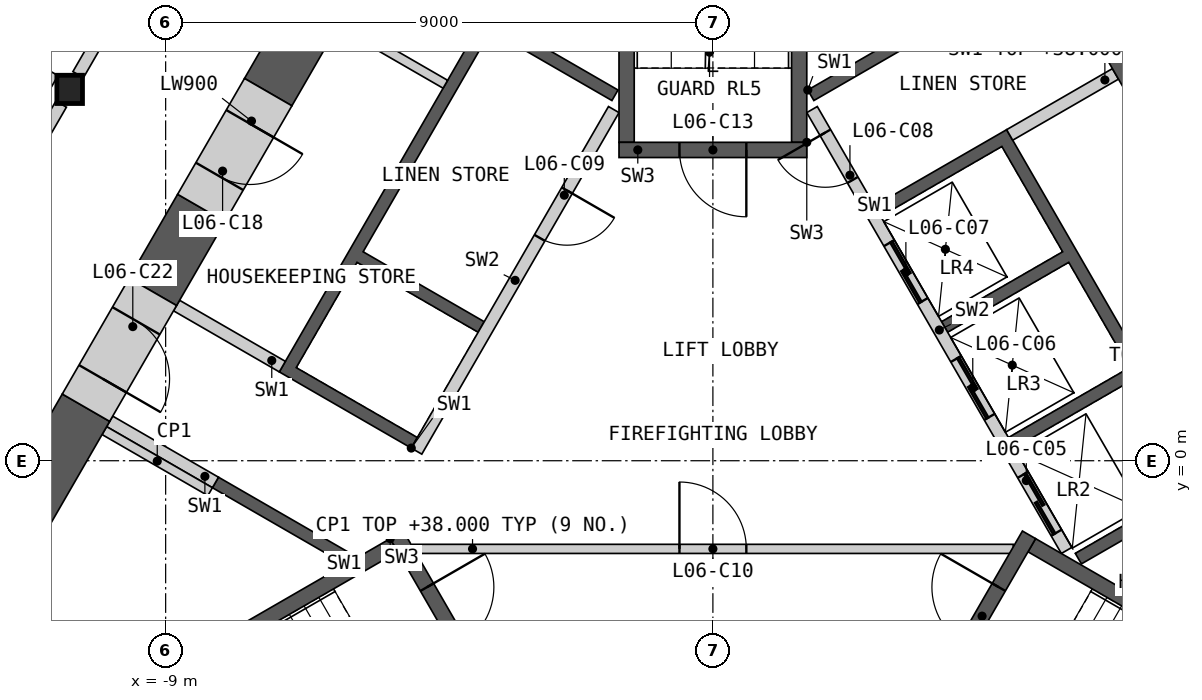
"""IFC4 building model, lengths in metres.
Left out: names, types, materials, properties, quantities, classifications, styles, units other than length and angle.
Written with IfcOpenShell. Run it as: python <this file> out.ifc"""

import sys

from ifc_helpers import new_model, si_unit, direction, frame, frame_2d, origin, origin_2d, place, context, subcontext, project, spatial, polyline, rectangle, i_section, outline, extrude, element, fill, save


model = new_model("IFC4")
c1 = context("Model", 3, precision=1e-05, world=origin(), true_north=direction((0.0, 1.0)))
c2 = subcontext(c1, "Body", "Model", "MODEL_VIEW")
j1 = project(units=[si_unit("LENGTHUNIT", "METRE"), si_unit("PLANEANGLEUNIT", "RADIAN")], contexts=[c1])
p1 = place(None, origin())
s1 = spatial("IfcSite", under=j1, at=p1, CompositionType="ELEMENT")
p2 = place(p1, origin())
s2 = spatial("IfcBuilding", under=s1, at=p2, CompositionType="ELEMENT")
p3 = place(p2, frame((0.0, 0.0, 34.2)))
s3 = spatial("IfcBuildingStorey", under=s2, at=p3, CompositionType="ELEMENT", Elevation=34.2)
p4 = place(p3, frame((-10.578, 6.107, 0.0), z_axis=(0.0, 0.0, 1.0), x_axis=(1.0, 0.0, 0.0)))
e1 = element("IfcColumn", 1, at=p4, inside=s3, PredefinedType="COLUMN", context=c2, shape_type="SweptSolid", body=[
    extrude(i_section(OverallWidth=0.421, OverallDepth=0.465, WebThickness=0.045, FlangeThickness=0.072, at=origin_2d()), origin(), (0.0, 0.0, 1.0), 4.2),
])
p5 = place(p3, origin())
e2 = element("IfcWall", 2, at=p5, inside=s3, PredefinedType="SHEAR", context=c2, shape_type="SweptSolid", body=[
    extrude(outline(polyline([(1.561, 6.097), (3.731, 7.35), (3.831, 7.177), (1.66, 5.924), (1.561, 6.097)])), origin(), (0.0, 0.0, 1.0), 3.8),
])
p6 = place(p3, origin())
e3 = element("IfcWall", 3, at=p6, inside=s3, PredefinedType="SHEAR", context=c2, shape_type="SweptSolid", body=[
    extrude(outline(polyline([(2.66, 4.192), (4.831, 5.445), (8.231, -0.444), (6.061, -1.697), (5.96, -1.524), (7.952, -0.374), (6.952, 1.358), (4.96, 0.208), (4.861, 0.381), (6.852, 1.531), (5.852, 3.263), (3.861, 2.113), (3.76, 2.287), (5.752, 3.437), (4.752, 5.169), (2.76, 4.019), (2.66, 4.192)])), origin(), (0.0, 0.0, 1.0), 3.8),
])
p7 = place(p3, frame((5.817, -1.476, 0.0), z_axis=(0.0, 0.0, 1.0), x_axis=(-0.500002616675, 0.866023893041, 0.0)))
e4 = element("IfcWall", 4, at=p7, inside=s3, PredefinedType="SOLIDWALL", context=c2, shape_type="SweptSolid", body=[
    extrude(rectangle(XDim=8.373, YDim=0.2, at=frame_2d((4.187, 0.0))), origin(), (0.0, 0.0, 1.0), 3.8),
])
p8 = place(p7, frame((0.337, 0.0, 0.0)))
e5 = element("IfcOpeningElement", 5, at=p8, cuts=e4, PredefinedType="OPENING", context=c2, shape_type="SweptSolid", body=[
    extrude(rectangle(XDim=1.1, YDim=2.1, at=frame_2d((0.55, 1.05))), frame((0.0, 0.11, 0.0), z_axis=(0.0, -1.0, 0.0), x_axis=(1.0, 0.0, 0.0)), (0.0, 0.0, 1.0), 0.22),
])
p9 = place(p7, frame((2.537, 0.0, 0.0)))
e6 = element("IfcOpeningElement", 6, at=p9, cuts=e4, PredefinedType="OPENING", context=c2, shape_type="SweptSolid", body=[
    extrude(rectangle(XDim=1.1, YDim=2.1, at=frame_2d((0.55, 1.05))), frame((0.0, 0.11, 0.0), z_axis=(0.0, -1.0, 0.0), x_axis=(1.0, 0.0, 0.0)), (0.0, 0.0, 1.0), 0.22),
])
p10 = place(p7, frame((4.737, 0.0, 0.0)))
e7 = element("IfcOpeningElement", 7, at=p10, cuts=e4, PredefinedType="OPENING", context=c2, shape_type="SweptSolid", body=[
    extrude(rectangle(XDim=1.1, YDim=2.1, at=frame_2d((0.55, 1.05))), frame((0.0, 0.11, 0.0), z_axis=(0.0, -1.0, 0.0), x_axis=(1.0, 0.0, 0.0)), (0.0, 0.0, 1.0), 0.22),
])
p11 = place(p7, frame((7.037, 0.0, 0.0)))
e8 = element("IfcOpeningElement", 8, at=p11, cuts=e4, PredefinedType="OPENING", context=c2, shape_type="SweptSolid", body=[
    extrude(rectangle(XDim=0.9, YDim=2.1, at=frame_2d((0.45, 1.05))), frame((0.0, 0.11, 0.0), z_axis=(0.0, -1.0, 0.0), x_axis=(1.0, 0.0, 0.0)), (0.0, 0.0, 1.0), 0.22),
])
p12 = place(p3, frame((4.881, 5.358, 0.0), z_axis=(0.0, 0.0, 1.0), x_axis=(0.866035824272, 0.499981950752, 0.0)))
e9 = element("IfcWall", 9, at=p12, inside=s3, PredefinedType="SHEAR", context=c2, shape_type="SweptSolid", body=[
    extrude(rectangle(XDim=2.009, YDim=0.2, at=frame_2d((1.004, 0.0))), origin(), (0.0, 0.0, 1.0), 3.8),
])
p13 = place(p3, origin())
e10 = element("IfcWall", 10, at=p13, inside=s3, PredefinedType="SHEAR", context=c2, shape_type="SweptSolid", body=[
    extrude(outline(polyline([(-6.061, -1.697), (-8.231, -0.444), (-8.131, -0.271), (-5.96, -1.524), (-6.061, -1.697)])), origin(), (0.0, 0.0, 1.0), 3.8),
])
p14 = place(p3, origin())
e11 = element("IfcWall", 11, at=p14, inside=s3, PredefinedType="SHEAR", context=c2, shape_type="SweptSolid", body=[
    extrude(outline(polyline([(-4.96, 0.208), (-7.131, 1.461), (-3.731, 7.35), (-1.561, 6.097), (-1.66, 5.924), (-3.652, 7.074), (-5.752, 3.437), (-3.76, 2.287), (-3.861, 2.113), (-5.852, 3.263), (-6.852, 1.531), (-4.861, 0.381), (-4.96, 0.208)])), origin(), (0.0, 0.0, 1.0), 3.8),
])
p15 = place(p3, frame((-1.631, 5.776, 0.0), z_axis=(0.0, 0.0, 1.0), x_axis=(-0.499992876559, -0.866029516466, 0.0)))
e12 = element("IfcWall", 12, at=p15, inside=s3, PredefinedType="SOLIDWALL", context=c2, shape_type="SweptSolid", body=[
    extrude(rectangle(XDim=6.486, YDim=0.2, at=frame_2d((3.243, 0.0))), origin(), (0.0, 0.0, 1.0), 3.8),
])
p16 = place(p15, frame((1.537, 0.0, 0.0)))
e13 = element("IfcOpeningElement", 13, at=p16, cuts=e12, PredefinedType="OPENING", context=c2, shape_type="SweptSolid", body=[
    extrude(rectangle(XDim=0.9, YDim=2.1, at=frame_2d((0.45, 1.05))), frame((0.0, 0.11, 0.0), z_axis=(0.0, -1.0, 0.0), x_axis=(1.0, 0.0, 0.0)), (0.0, 0.0, 1.0), 0.22),
])
p17 = place(p3, frame((-7.081, 1.548, 0.0), z_axis=(0.0, 0.0, 1.0), x_axis=(-0.865983199114, 0.50007309351, 0.0)))
e14 = element("IfcWall", 14, at=p17, inside=s3, PredefinedType="SHEAR", context=c2, shape_type="SweptSolid", body=[
    extrude(rectangle(XDim=2.009, YDim=0.2, at=frame_2d((1.004, 0.0))), origin(), (0.0, 0.0, 1.0), 3.8),
])
p18 = place(p3, frame((-8.181, -0.357, 0.0), z_axis=(0.0, 0.0, 1.0), x_axis=(-0.866035824272, 0.499981950752, 0.0)))
e15 = element("IfcWall", 15, at=p18, inside=s3, PredefinedType="SHEAR", context=c2, shape_type="SweptSolid", body=[
    extrude(rectangle(XDim=2.009, YDim=0.2, at=frame_2d((1.004, 0.0))), origin(), (0.0, 0.0, 1.0), 3.8),
])
p19 = place(p3, frame((-4.941, -1.45, 0.0), z_axis=(0.0, 0.0, 1.0), x_axis=(1.0, 0.0, 0.0)))
e16 = element("IfcWall", 16, at=p19, inside=s3, PredefinedType="PARTITIONING", context=c2, shape_type="SweptSolid", body=[
    extrude(rectangle(XDim=9.882, YDim=0.15, at=frame_2d((4.941, 0.0))), origin(), (0.0, 0.0, 1.0), 3.8),
])
p20 = place(p19, frame((4.391, 0.0, 0.0)))
e17 = element("IfcOpeningElement", 17, at=p20, cuts=e16, PredefinedType="OPENING", context=c2, shape_type="SweptSolid", body=[
    extrude(rectangle(XDim=1.1, YDim=2.1, at=frame_2d((0.55, 1.05))), frame((0.0, 0.085, 0.0), z_axis=(0.0, -1.0, 0.0), x_axis=(1.0, 0.0, 0.0)), (0.0, 0.0, 1.0), 0.17),
])
p21 = place(p3, origin())
e18 = element("IfcWall", 18, at=p21, inside=s3, PredefinedType="SHEAR", context=c2, shape_type="SweptSolid", body=[
    extrude(outline(polyline([(-5.307, -1.281), (-10.374, -4.206), (-10.032, -4.298), (-5.182, -1.498), (-5.307, -1.281)])), origin(), (0.0, 0.0, 1.0), 3.8),
])
p22 = place(p3, frame((-5.199, -1.219, 0.0), z_axis=(0.0, 0.0, 1.0), x_axis=(0.499982516597, -0.866035497597, 0.0)))
e19 = element("IfcWall", 19, at=p22, inside=s3, PredefinedType="SHEAR", context=c2, shape_type="SweptSolid", body=[
    extrude(rectangle(XDim=3.088, YDim=0.25, at=frame_2d((1.544, 0.0))), origin(), (0.0, 0.0, 1.0), 3.8),
])
p23 = place(p22, frame((0.994, 0.0, 0.0)))
e20 = element("IfcOpeningElement", 20, at=p23, cuts=e19, PredefinedType="OPENING", context=c2, shape_type="SweptSolid", body=[
    extrude(rectangle(XDim=1.1, YDim=2.1, at=frame_2d((0.55, 1.05))), frame((0.0, 0.135, 0.0), z_axis=(0.0, -1.0, 0.0), x_axis=(1.0, 0.0, 0.0)), (0.0, 0.0, 1.0), 0.27),
])
p24 = place(p3, origin())
e21 = element("IfcWall", 21, at=p24, inside=s3, PredefinedType="SHEAR", context=c2, shape_type="SweptSolid", body=[
    extrude(outline(polyline([(10.032, -4.298), (10.374, -4.206), (5.307, -1.281), (5.182, -1.498), (10.032, -4.298)])), origin(), (0.0, 0.0, 1.0), 3.8),
])
p25 = place(p3, frame((3.655, -3.893, 0.0), z_axis=(0.0, 0.0, 1.0), x_axis=(0.499982516597, 0.866035497597, 0.0)))
e22 = element("IfcWall", 22, at=p25, inside=s3, PredefinedType="SHEAR", context=c2, shape_type="SweptSolid", body=[
    extrude(rectangle(XDim=3.088, YDim=0.25, at=frame_2d((1.544, 0.0))), origin(), (0.0, 0.0, 1.0), 3.8),
])
p26 = place(p25, frame((0.994, 0.0, 0.0)))
e23 = element("IfcOpeningElement", 23, at=p26, cuts=e22, PredefinedType="OPENING", context=c2, shape_type="SweptSolid", body=[
    extrude(rectangle(XDim=1.1, YDim=2.1, at=frame_2d((0.55, 1.05))), frame((0.0, 0.135, 0.0), z_axis=(0.0, -1.0, 0.0), x_axis=(1.0, 0.0, 0.0)), (0.0, 0.0, 1.0), 0.27),
])
p27 = place(p3, origin())
e24 = element("IfcWall", 24, at=p27, inside=s3, PredefinedType="SHEAR", context=c2, shape_type="SweptSolid", body=[
    extrude(outline(polyline([(1.544, 5.237), (1.544, 11.087), (1.294, 10.837), (1.294, 5.237), (1.544, 5.237)])), origin(), (0.0, 0.0, 1.0), 3.8),
])
p28 = place(p3, origin())
e25 = element("IfcWall", 25, at=p28, inside=s3, PredefinedType="SHEAR", context=c2, shape_type="SweptSolid", body=[
    extrude(outline(polyline([(-1.294, 10.837), (-1.544, 11.087), (-1.544, 5.237), (-1.294, 5.237), (-1.294, 10.837)])), origin(), (0.0, 0.0, 1.0), 3.8),
])
p29 = place(p3, frame((1.544, 5.112, 0.0), z_axis=(0.0, 0.0, 1.0), x_axis=(-1.0, 0.0, 0.0)))
e26 = element("IfcWall", 26, at=p29, inside=s3, PredefinedType="SHEAR", context=c2, shape_type="SweptSolid", body=[
    extrude(rectangle(XDim=3.088, YDim=0.25, at=frame_2d((1.544, 0.0))), origin(), (0.0, 0.0, 1.0), 3.8),
])
p30 = place(p29, frame((0.994, 0.0, 0.0)))
e27 = element("IfcOpeningElement", 27, at=p30, cuts=e26, PredefinedType="OPENING", context=c2, shape_type="SweptSolid", body=[
    extrude(rectangle(XDim=1.1, YDim=2.1, at=frame_2d((0.55, 1.05))), frame((0.0, 0.135, 0.0), z_axis=(0.0, -1.0, 0.0), x_axis=(1.0, 0.0, 0.0)), (0.0, 0.0, 1.0), 0.27),
])
for number, where, z_axis, x_axis in (
    (28, (-8.268, -0.509, 0.0), (0.0, 0.0, 1.0), (-0.866, 0.5, 0.0)),
    (29, (-6.139, 7.196, 0.0), (0.0, 0.0, 1.0), (0.866, -0.5, 0.0)),
):
    element("IfcWall", number, at=place(p3, frame(where, z_axis=z_axis, x_axis=x_axis)), inside=s3, PredefinedType="PARTITIONING", context=c2, shape_type="SweptSolid", body=[
        extrude(rectangle(XDim=2.009, YDim=0.15, at=frame_2d((1.004, 0.0))), origin(), (0.0, 0.0, 1.0), 3.8),
    ])
p31 = place(p3, frame((8.16, 4.596, 0.0), z_axis=(0.0, 0.0, 1.0), x_axis=(-0.500012259336, 0.866018325738, 0.0)))
e30 = element("IfcWall", 30, at=p31, inside=s3, PredefinedType="SHEAR", context=c2, shape_type="SweptSolid", body=[
    extrude(rectangle(XDim=7.389, YDim=0.9, at=frame_2d((3.695, 0.0))), origin(), (0.0, 0.0, 1.0), 3.8),
])
p32 = place(p3, frame((-10.31, 0.872, 0.0), z_axis=(0.0, 0.0, 1.0), x_axis=(-0.499946751862, -0.866056144429, 0.0)))
e31 = element("IfcWall", 31, at=p32, inside=s3, PredefinedType="SHEAR", context=c2, shape_type="SweptSolid", body=[
    extrude(rectangle(XDim=2.889, YDim=0.9, at=frame_2d((1.445, 0.0))), origin(), (0.0, 0.0, 1.0), 3.8),
])
p33 = place(p3, frame((-6.145, 8.086, 0.0), z_axis=(0.0, 0.0, 1.0), x_axis=(-0.500026924946, -0.866009858102, 0.0)))
e32 = element("IfcWall", 32, at=p33, inside=s3, PredefinedType="SHEAR", context=c2, shape_type="SweptSolid", body=[
    extrude(rectangle(XDim=2.337, YDim=0.9, at=frame_2d((1.168, 0.0))), origin(), (0.0, 0.0, 1.0), 3.8),
])
p34 = place(p3, frame((-8.413, 4.157, 0.0), z_axis=(0.0, 0.0, 1.0), x_axis=(-0.499961121316, -0.86604784924, 0.0)))
e33 = element("IfcWall", 33, at=p34, inside=s3, PredefinedType="SHEAR", context=c2, shape_type="SweptSolid", body=[
    extrude(rectangle(XDim=1.594, YDim=0.9, at=frame_2d((0.797, 0.0))), origin(), (0.0, 0.0, 1.0), 3.8),
])
p35 = place(p3, frame((-7.313, 6.062, 0.0), z_axis=(0.0, 0.0, 1.0), x_axis=(-0.500077893725, -0.86598042715, 0.0)))
e34 = element("IfcWall", 34, at=p35, inside=s3, PredefinedType="SHEAR", context=c2, shape_type="SweptSolid", body=[
    extrude(rectangle(XDim=2.2, YDim=0.9, at=frame_2d((1.1, 0.0))), origin(), (0.0, 0.0, 1.0), 3.8),
])
p36 = place(p35, frame((0.6, 0.0, 0.0)))
e35 = element("IfcOpeningElement", 35, at=p36, cuts=e34, PredefinedType="OPENING", context=c2, shape_type="SweptSolid", body=[
    extrude(rectangle(XDim=1.0, YDim=2.1, at=frame_2d((0.5, 1.05))), frame((0.0, 0.46, 0.0), z_axis=(0.0, -1.0, 0.0), x_axis=(1.0, 0.0, 0.0)), (0.0, 0.0, 1.0), 0.92),
])
p37 = place(p3, frame((-9.21, 2.777, 0.0), z_axis=(0.0, 0.0, 1.0), x_axis=(-0.500077893725, -0.86598042715, 0.0)))
e36 = element("IfcWall", 36, at=p37, inside=s3, PredefinedType="SHEAR", context=c2, shape_type="SweptSolid", body=[
    extrude(rectangle(XDim=2.2, YDim=0.9, at=frame_2d((1.1, 0.0))), origin(), (0.0, 0.0, 1.0), 3.8),
])
p38 = place(p37, frame((0.55, 0.0, 0.0)))
e37 = element("IfcOpeningElement", 37, at=p38, cuts=e36, PredefinedType="OPENING", context=c2, shape_type="SweptSolid", body=[
    extrude(rectangle(XDim=1.1, YDim=2.1, at=frame_2d((0.55, 1.05))), frame((0.0, 0.46, 0.0), z_axis=(0.0, -1.0, 0.0), x_axis=(1.0, 0.0, 0.0)), (0.0, 0.0, 1.0), 0.92),
])
p39 = place(p3, frame((5.429, 15.026, 0.0), z_axis=(0.0, 0.0, 1.0), x_axis=(0.50001002959, -0.86601961312, 0.0)))
e38 = element("IfcWall", 38, at=p39, inside=s3, PredefinedType="PARTITIONING", context=c2, shape_type="SweptSolid", body=[
    extrude(rectangle(XDim=10.019, YDim=0.2, at=frame_2d((5.009, 0.0))), origin(), (0.0, 0.0, 1.0), 3.8),
])
p40 = place(p39, frame((7.266, 0.0, 0.0)))
e39 = element("IfcOpeningElement", 39, at=p40, cuts=e38, PredefinedType="OPENING", context=c2, shape_type="SweptSolid", body=[
    extrude(rectangle(XDim=1.0, YDim=2.1, at=frame_2d((0.5, 1.05))), frame((0.0, 0.11, 0.0), z_axis=(0.0, -1.0, 0.0), x_axis=(1.0, 0.0, 0.0)), (0.0, 0.0, 1.0), 0.22),
])
p41 = place(p39, frame((2.254, 0.0, 0.0)))
e40 = element("IfcOpeningElement", 40, at=p41, cuts=e38, PredefinedType="OPENING", context=c2, shape_type="SweptSolid", body=[
    extrude(rectangle(XDim=1.0, YDim=2.1, at=frame_2d((0.5, 1.05))), frame((0.0, 0.11, 0.0), z_axis=(0.0, -1.0, 0.0), x_axis=(1.0, 0.0, 0.0)), (0.0, 0.0, 1.0), 0.22),
])
p42 = place(p3, frame((-10.439, 6.35, 0.0), z_axis=(0.0, 0.0, 1.0), x_axis=(0.50001002959, 0.86601961312, 0.0)))
e41 = element("IfcWall", 41, at=p42, inside=s3, PredefinedType="PARTITIONING", context=c2, shape_type="SweptSolid", body=[
    extrude(rectangle(XDim=10.019, YDim=0.2, at=frame_2d((5.009, 0.0))), origin(), (0.0, 0.0, 1.0), 3.8),
])
p43 = place(p42, frame((4.16, 0.0, 0.0)))
e42 = element("IfcOpeningElement", 42, at=p43, cuts=e41, PredefinedType="OPENING", context=c2, shape_type="SweptSolid", body=[
    extrude(rectangle(XDim=1.8, YDim=2.1, at=frame_2d((0.9, 1.05))), frame((0.0, 0.11, 0.0), z_axis=(0.0, -1.0, 0.0), x_axis=(1.0, 0.0, 0.0)), (0.0, 0.0, 1.0), 0.22),
])
p44 = place(p3, frame((-15.728, -2.811, 0.0), z_axis=(0.0, 0.0, 1.0), x_axis=(0.49999175339, 0.866030164915, 0.0)))
e43 = element("IfcWall", 43, at=p44, inside=s3, PredefinedType="PARTITIONING", context=c2, shape_type="SweptSolid", body=[
    extrude(rectangle(XDim=10.019, YDim=0.2, at=frame_2d((5.009, 0.0))), origin(), (0.0, 0.0, 1.0), 3.8),
])
p45 = place(p44, frame((4.484, 0.0, 0.0)))
e44 = element("IfcOpeningElement", 44, at=p45, cuts=e43, PredefinedType="OPENING", context=c2, shape_type="SweptSolid", body=[
    extrude(rectangle(XDim=0.95, YDim=2.1, at=frame_2d((0.475, 1.05))), frame((0.0, 0.11, 0.0), z_axis=(0.0, -1.0, 0.0), x_axis=(1.0, 0.0, 0.0)), (0.0, 0.0, 1.0), 0.22),
])
p46 = place(p3, frame((-21.947, 12.671, 0.0), z_axis=(0.0, 0.0, 1.0), x_axis=(0.866026729935, -0.499997703033, 0.0)))
e45 = element("IfcWall", 45, at=p46, inside=s3, PredefinedType="PARTITIONING", context=c2, shape_type="SweptSolid", body=[
    extrude(rectangle(XDim=12.848, YDim=0.2, at=frame_2d((6.424, 0.0))), origin(), (0.0, 0.0, 1.0), 2.885),
])
p47 = place(p8, origin())
e46 = element("IfcDoor", 46, at=p47, inside=s3, OperationType="SLIDING_TO_LEFT", PredefinedType="DOOR", context=c2, shape_type="SweptSolid", body=[
    extrude(rectangle(XDim=1.1, YDim=2.1, at=frame_2d((0.55, 1.05))), frame((0.0, 0.025, 0.0), z_axis=(0.0, -1.0, 0.0), x_axis=(1.0, 0.0, 0.0)), (0.0, 0.0, 1.0), 0.05),
])
fill(e5, e46)
p48 = place(p9, origin())
e47 = element("IfcDoor", 47, at=p48, inside=s3, OperationType="SLIDING_TO_LEFT", PredefinedType="DOOR", context=c2, shape_type="SweptSolid", body=[
    extrude(rectangle(XDim=1.1, YDim=2.1, at=frame_2d((0.55, 1.05))), frame((0.0, 0.025, 0.0), z_axis=(0.0, -1.0, 0.0), x_axis=(1.0, 0.0, 0.0)), (0.0, 0.0, 1.0), 0.05),
])
fill(e6, e47)
p49 = place(p10, origin())
e48 = element("IfcDoor", 48, at=p49, inside=s3, OperationType="SLIDING_TO_LEFT", PredefinedType="DOOR", context=c2, shape_type="SweptSolid", body=[
    extrude(rectangle(XDim=1.1, YDim=2.1, at=frame_2d((0.55, 1.05))), frame((0.0, 0.025, 0.0), z_axis=(0.0, -1.0, 0.0), x_axis=(1.0, 0.0, 0.0)), (0.0, 0.0, 1.0), 0.05),
])
fill(e7, e48)
p50 = place(p11, origin())
e49 = element("IfcDoor", 49, at=p50, inside=s3, OperationType="SINGLE_SWING_RIGHT", PredefinedType="DOOR", context=c2, shape_type="SweptSolid", body=[
    extrude(rectangle(XDim=0.9, YDim=2.1, at=frame_2d((0.45, 1.05))), frame((0.0, 0.025, 0.0), z_axis=(0.0, -1.0, 0.0), x_axis=(1.0, 0.0, 0.0)), (0.0, 0.0, 1.0), 0.05),
])
fill(e8, e49)
p51 = place(p16, origin())
e50 = element("IfcDoor", 50, at=p51, inside=s3, OperationType="SINGLE_SWING_LEFT", PredefinedType="DOOR", context=c2, shape_type="SweptSolid", body=[
    extrude(rectangle(XDim=0.9, YDim=2.1, at=frame_2d((0.45, 1.05))), frame((0.0, 0.025, 0.0), z_axis=(0.0, -1.0, 0.0), x_axis=(1.0, 0.0, 0.0)), (0.0, 0.0, 1.0), 0.05),
])
fill(e13, e50)
p52 = place(p20, origin())
e51 = element("IfcDoor", 51, at=p52, inside=s3, OperationType="SINGLE_SWING_LEFT", PredefinedType="DOOR", context=c2, shape_type="SweptSolid", body=[
    extrude(rectangle(XDim=1.1, YDim=2.1, at=frame_2d((0.55, 1.05))), frame((0.0, 0.025, 0.0), z_axis=(0.0, -1.0, 0.0), x_axis=(1.0, 0.0, 0.0)), (0.0, 0.0, 1.0), 0.05),
])
fill(e17, e51)
p53 = place(p23, origin())
e52 = element("IfcDoor", 52, at=p53, inside=s3, OperationType="SINGLE_SWING_LEFT", PredefinedType="DOOR", context=c2, shape_type="SweptSolid", body=[
    extrude(rectangle(XDim=1.1, YDim=2.1, at=frame_2d((0.55, 1.05))), frame((0.0, 0.025, 0.0), z_axis=(0.0, -1.0, 0.0), x_axis=(1.0, 0.0, 0.0)), (0.0, 0.0, 1.0), 0.05),
])
fill(e20, e52)
p54 = place(p26, origin())
e53 = element("IfcDoor", 53, at=p54, inside=s3, OperationType="SINGLE_SWING_RIGHT", PredefinedType="DOOR", context=c2, shape_type="SweptSolid", body=[
    extrude(rectangle(XDim=1.1, YDim=2.1, at=frame_2d((0.55, 1.05))), frame((0.0, 0.025, 0.0), z_axis=(0.0, -1.0, 0.0), x_axis=(1.0, 0.0, 0.0)), (0.0, 0.0, 1.0), 0.05),
])
fill(e23, e53)
p55 = place(p30, origin())
e54 = element("IfcDoor", 54, at=p55, inside=s3, OperationType="SINGLE_SWING_LEFT", PredefinedType="DOOR", context=c2, shape_type="SweptSolid", body=[
    extrude(rectangle(XDim=1.1, YDim=2.1, at=frame_2d((0.55, 1.05))), frame((0.0, 0.025, 0.0), z_axis=(0.0, -1.0, 0.0), x_axis=(1.0, 0.0, 0.0)), (0.0, 0.0, 1.0), 0.05),
])
fill(e27, e54)
p56 = place(p36, origin())
e55 = element("IfcDoor", 55, at=p56, inside=s3, OperationType="SINGLE_SWING_LEFT", PredefinedType="DOOR", context=c2, shape_type="SweptSolid", body=[
    extrude(rectangle(XDim=1.0, YDim=2.1, at=frame_2d((0.5, 1.05))), frame((0.0, 0.205, 0.0), z_axis=(0.0, -1.0, 0.0), x_axis=(1.0, 0.0, 0.0)), (0.0, 0.0, 1.0), 0.05),
])
fill(e35, e55)
p57 = place(p38, origin())
e56 = element("IfcDoor", 56, at=p57, inside=s3, OperationType="SINGLE_SWING_RIGHT", PredefinedType="DOOR", context=c2, shape_type="SweptSolid", body=[
    extrude(rectangle(XDim=1.1, YDim=2.1, at=frame_2d((0.55, 1.05))), frame((0.0, 0.205, 0.0), z_axis=(0.0, -1.0, 0.0), x_axis=(1.0, 0.0, 0.0)), (0.0, 0.0, 1.0), 0.05),
])
fill(e37, e56)
save(model, sys.argv[1])
